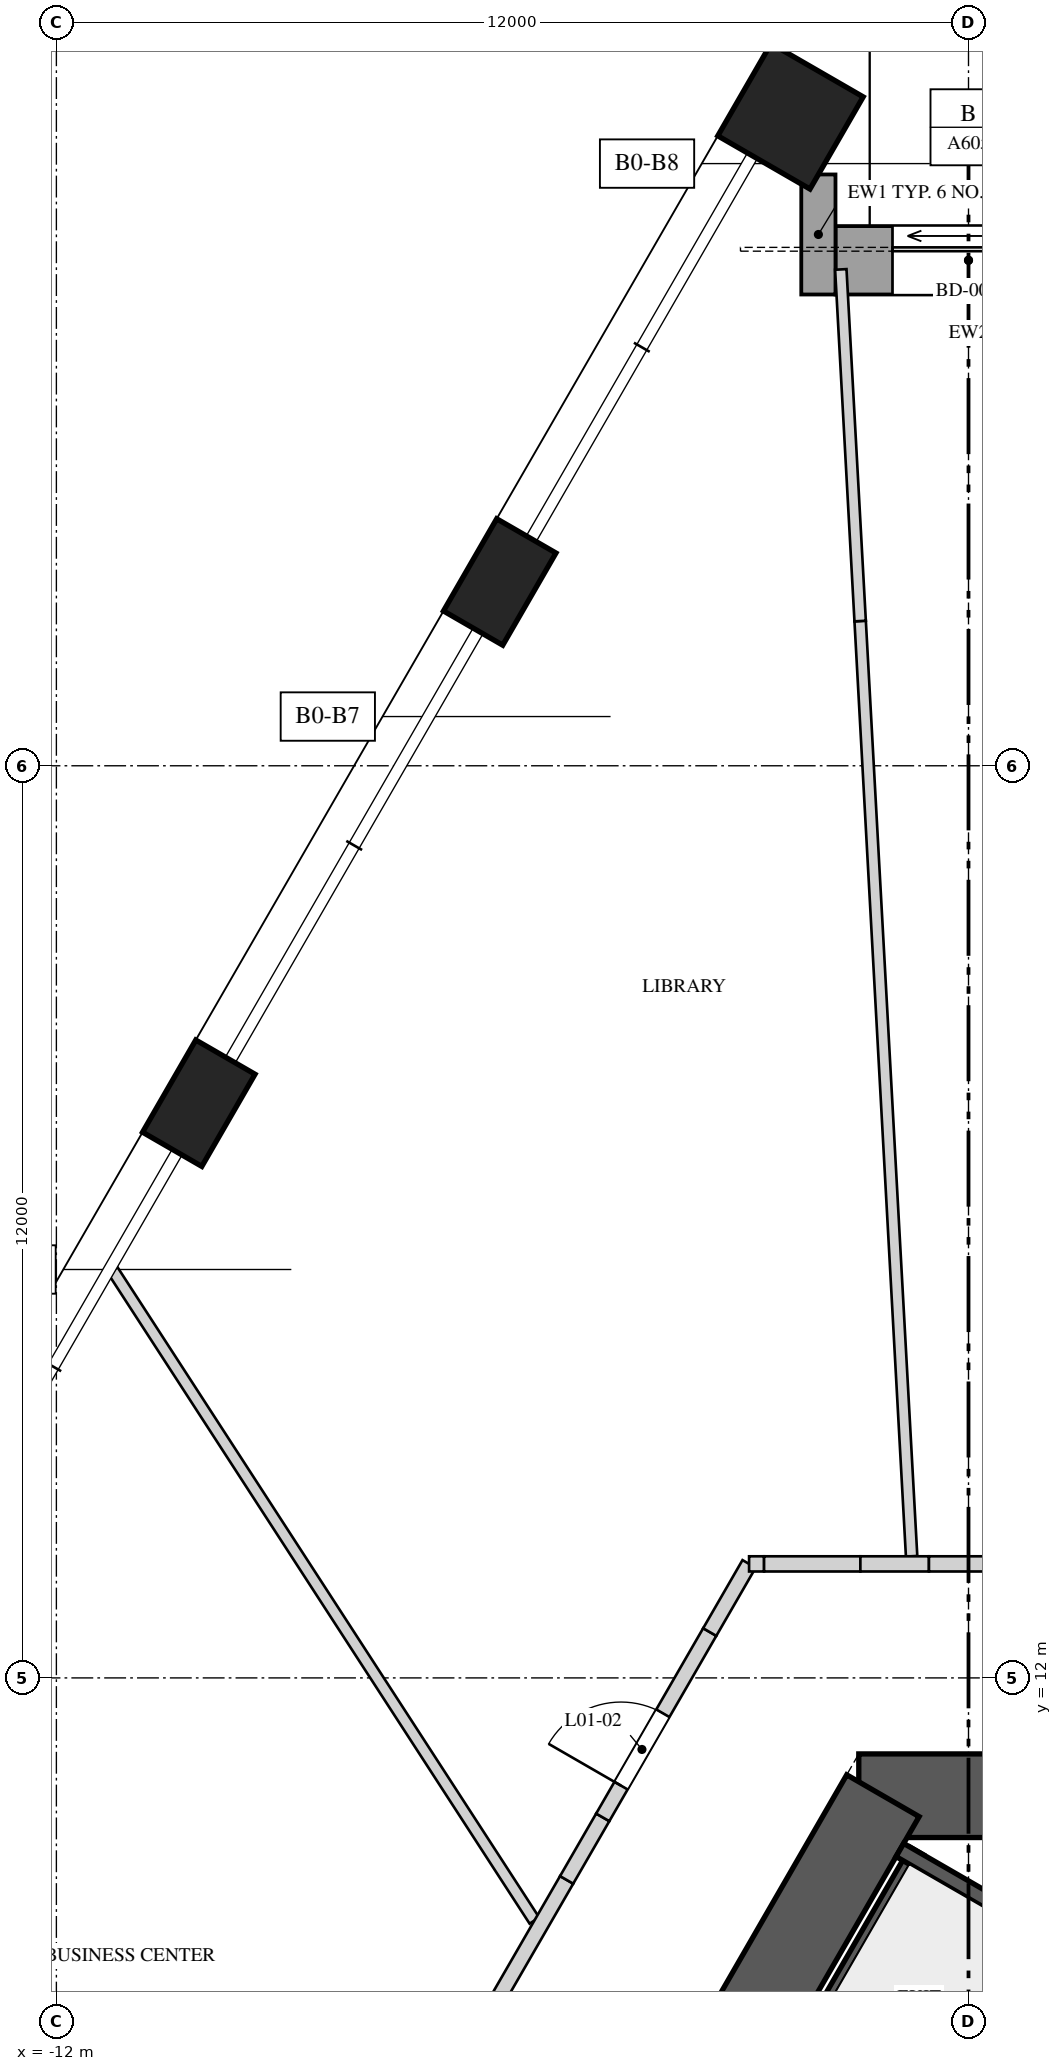
"""IFC4 building model, lengths in metres.
Left out: names, types, materials, properties, quantities, classifications, styles, units other than length and angle.
Written with IfcOpenShell. Run it as: python <this file> out.ifc"""

import sys

from ifc_helpers import new_model, si_unit, direction, frame, frame_2d, origin, origin_2d, place, context, subcontext, project, spatial, rectangle, extrude, element, fill, save


model = new_model("IFC4")
c1 = context("Model", 3, precision=1e-05, world=origin(), true_north=direction((0.0, 1.0)))
c2 = subcontext(c1, "Body", "Model", "MODEL_VIEW")
j1 = project(units=[si_unit("LENGTHUNIT", "METRE"), si_unit("PLANEANGLEUNIT", "RADIAN")], contexts=[c1])
p1 = place(None, origin())
s1 = spatial("IfcSite", under=j1, at=p1, CompositionType="ELEMENT")
p2 = place(p1, origin())
s2 = spatial("IfcBuilding", under=s1, at=p2, CompositionType="ELEMENT")
p3 = place(p2, frame((0.0, 0.0, 10.0)))
s3 = spatial("IfcBuildingStorey", under=s2, at=p3, CompositionType="ELEMENT", Elevation=10.0)
p4 = place(p3, frame((1.443, 10.45, 0.0), z_axis=(0.0, 0.0, 1.0), x_axis=(-1.0, 0.0, 0.0)))
e1 = element("IfcWall", 1, at=p4, inside=s3, PredefinedType="SHEAR", context=c2, shape_type="SweptSolid", body=[
    extrude(rectangle(XDim=2.887, YDim=1.1, at=frame_2d((1.443, 0.0))), origin(), (0.0, 0.0, 1.0), 5.0),
])
p5 = place(p3, frame((-1.126, 10.45, 0.0), z_axis=(0.0, 0.0, 1.0), x_axis=(-0.500001757713, -0.866024388966, 0.0)))
e2 = element("IfcWall", 2, at=p5, inside=s3, PredefinedType="SHEAR", context=c2, shape_type="SweptSolid", body=[
    extrude(rectangle(XDim=16.974, YDim=1.1, at=frame_2d((8.487, 0.0))), origin(), (0.0, 0.0, 1.0), 5.0),
])
p6 = place(p5, frame((6.692, 0.0, 0.0)))
e3 = element("IfcOpeningElement", 3, at=p6, cuts=e2, PredefinedType="OPENING", context=c2, shape_type="SweptSolid", body=[
    extrude(rectangle(XDim=1.0, YDim=2.4, at=frame_2d((0.5, 1.2))), frame((0.0, 0.56, 0.0), z_axis=(0.0, -1.0, 0.0), x_axis=(1.0, 0.0, 0.0)), (0.0, 0.0, 1.0), 1.12),
])
p7 = place(p5, frame((14.397, 0.0, 0.0)))
e4 = element("IfcOpeningElement", 4, at=p7, cuts=e2, PredefinedType="OPENING", context=c2, shape_type="SweptSolid", body=[
    extrude(rectangle(XDim=0.8, YDim=2.1, at=frame_2d((0.4, 1.05))), frame((0.0, 0.56, 0.0), z_axis=(0.0, -1.0, 0.0), x_axis=(1.0, 0.0, 0.0)), (0.0, 0.0, 1.0), 1.12),
])
p8 = place(p3, frame((-2.342, 32.544, 0.0), z_axis=(0.0, 0.0, 1.0), x_axis=(-0.5, -0.866025403784, 0.0)))
e5 = element("IfcColumn", 5, at=p8, inside=s3, PredefinedType="COLUMN", context=c2, shape_type="SweptSolid", body=[
    extrude(rectangle(XDim=1.4, YDim=1.4, at=origin_2d()), origin(), (0.0, 0.0, 1.0), 5.0),
])
for number, where, z_axis, x_axis in (
    (6, (-6.167, 26.418, 0.0), (0.0, 0.0, 1.0), (-0.5, -0.866, 0.0)),
    (7, (-10.126, 19.561, 0.0), (0.0, 0.0, 1.0), (-0.5, -0.866, 0.0)),
):
    element("IfcColumn", number, at=place(p3, frame(where, z_axis=z_axis, x_axis=x_axis)), inside=s3, PredefinedType="COLUMN", context=c2, shape_type="SweptSolid", body=[
        extrude(rectangle(XDim=1.4, YDim=0.9, at=origin_2d()), origin(), (0.0, 0.0, 1.0), 5.0),
    ])
p9 = place(p3, frame((-1.75, 30.65, 0.0), z_axis=(0.0, 0.0, 1.0), x_axis=(1.0, 0.0, 0.0)))
e8 = element("IfcWall", 8, at=p9, inside=s3, PredefinedType="SOLIDWALL", context=c2, shape_type="SweptSolid", body=[
    extrude(rectangle(XDim=3.5, YDim=0.9, at=frame_2d((1.75, 0.0))), origin(), (0.0, 0.0, 1.0), 4.3),
])
p10 = place(p9, frame((0.75, 0.0, 0.0)))
e9 = element("IfcOpeningElement", 9, at=p10, cuts=e8, PredefinedType="OPENING", context=c2, shape_type="SweptSolid", body=[
    extrude(rectangle(XDim=2.0, YDim=2.4, at=frame_2d((1.0, 1.2))), frame((0.0, 0.46, 0.0), z_axis=(0.0, -1.0, 0.0), x_axis=(1.0, 0.0, 0.0)), (0.0, 0.0, 1.0), 0.92),
])
p11 = place(p3, frame((-1.975, 31.779, 0.0), z_axis=(0.0, 0.0, 1.0), x_axis=(0.0, -1.0, 0.0)))
e10 = element("IfcWall", 10, at=p11, inside=s3, PredefinedType="SOLIDWALL", context=c2, shape_type="SweptSolid", body=[
    extrude(rectangle(XDim=1.579, YDim=0.45, at=frame_2d((0.79, 0.0))), origin(), (0.0, 0.0, 1.0), 2.55),
])
p12 = place(p3, frame((-0.68, 9.722, 0.0), z_axis=(0.0, 0.0, 1.0), x_axis=(-0.49998037582, -0.866036733513, 0.0)))
e11 = element("IfcWall", 11, at=p12, inside=s3, PredefinedType="SOLIDWALL", context=c2, shape_type="SweptSolid", body=[
    extrude(rectangle(XDim=6.2, YDim=0.2, at=frame_2d((3.1, 0.0))), origin(), (0.0, 0.0, 1.0), 4.65),
])
p13 = place(p3, frame((1.646, 8.45, 0.0), z_axis=(0.0, 0.0, 1.0), x_axis=(-0.500006002103, -0.866021938441, 0.0)))
e12 = element("IfcWall", 12, at=p13, inside=s3, PredefinedType="SOLIDWALL", context=c2, shape_type="SweptSolid", body=[
    extrude(rectangle(XDim=6.261, YDim=0.2, at=frame_2d((3.13, 0.0))), origin(), (0.0, 0.0, 1.0), 4.65),
])
p14 = place(p3, frame((1.806, 8.172, 0.0), z_axis=(0.0, 0.0, 1.0), x_axis=(-0.866054327916, 0.499949898588, 0.0)))
e13 = element("IfcWall", 13, at=p14, inside=s3, PredefinedType="SOLIDWALL", context=c2, shape_type="SweptSolid", body=[
    extrude(rectangle(XDim=3.128, YDim=0.2, at=frame_2d((1.564, 0.0))), origin(), (0.0, 0.0, 1.0), 4.65),
])
p15 = place(p3, frame((-5.711, 8.808, 0.0), z_axis=(0.0, 0.0, 1.0), x_axis=(-0.544077203012, 0.839035158478, 0.0)))
e14 = element("IfcWall", 14, at=p15, inside=s3, PredefinedType="PARTITIONING", context=c2, shape_type="SweptSolid", body=[
    extrude(rectangle(XDim=10.194, YDim=0.15, at=frame_2d((5.097, 0.0))), origin(), (0.0, 0.0, 1.0), 4.65),
])
p16 = place(p3, frame((-0.748, 13.6, 0.0), z_axis=(0.0, 0.0, 1.0), x_axis=(-0.054959765321, 0.998488569887, 0.0)))
e15 = element("IfcWall", 15, at=p16, inside=s3, PredefinedType="PARTITIONING", context=c2, shape_type="SweptSolid", body=[
    extrude(rectangle(XDim=12.323, YDim=0.15, at=frame_2d((6.161, 0.0))), origin(), (0.0, 0.0, 1.0), 3.55),
])
p17 = place(p3, frame((-1.426, 25.904, 0.0), z_axis=(0.0, 0.0, 1.0), x_axis=(-0.05490964551, 0.998491327368, 0.0)))
e16 = element("IfcWall", 16, at=p17, inside=s3, PredefinedType="PARTITIONING", context=c2, shape_type="SweptSolid", body=[
    extrude(rectangle(XDim=4.633, YDim=0.15, at=frame_2d((2.316, 0.0))), origin(), (0.0, 0.0, 1.0), 4.65),
])
p18 = place(p3, frame((-6.819, 6.689, 0.0), z_axis=(0.0, 0.0, 1.0), x_axis=(0.499952348839, 0.866052913447, 0.0)))
e17 = element("IfcWall", 17, at=p18, inside=s3, PredefinedType="SOLIDWALL", context=c2, shape_type="SweptSolid", body=[
    extrude(rectangle(XDim=3.064, YDim=0.2, at=frame_2d((1.532, 0.0))), origin(), (0.0, 0.0, 1.0), 4.65),
])
p19 = place(p3, frame((-5.287, 9.343, 0.0), z_axis=(0.0, 0.0, 1.0), x_axis=(0.500174821557, 0.865924446982, 0.0)))
e18 = element("IfcWall", 18, at=p19, inside=s3, PredefinedType="SOLIDWALL", context=c2, shape_type="SweptSolid", body=[
    extrude(rectangle(XDim=0.95, YDim=0.2, at=frame_2d((0.475, 0.0))), origin(), (0.0, 0.0, 1.0), 3.75),
])
p20 = place(p3, frame((-4.812, 10.165, 0.0), z_axis=(0.0, 0.0, 1.0), x_axis=(0.500000186108, 0.866025296335, 0.0)))
e19 = element("IfcWall", 19, at=p20, inside=s3, PredefinedType="SOLIDWALL", context=c2, shape_type="SweptSolid", body=[
    extrude(rectangle(XDim=2.815, YDim=0.2, at=frame_2d((1.408, 0.0))), origin(), (0.0, 0.0, 1.0), 4.65),
])
p21 = place(p20, frame((0.482, 0.0, 0.0)))
e20 = element("IfcOpeningElement", 20, at=p21, cuts=e19, PredefinedType="OPENING", context=c2, shape_type="SweptSolid", body=[
    extrude(rectangle(XDim=1.1, YDim=2.4, at=frame_2d((0.55, 1.2))), frame((0.0, 0.11, 0.0), z_axis=(0.0, -1.0, 0.0), x_axis=(1.0, 0.0, 0.0)), (0.0, 0.0, 1.0), 0.22),
])
p22 = place(p3, frame((-3.404, 12.604, 0.0), z_axis=(0.0, 0.0, 1.0), x_axis=(0.499994660107, 0.866028486751, 0.0)))
e21 = element("IfcWall", 21, at=p22, inside=s3, PredefinedType="SOLIDWALL", context=c2, shape_type="SweptSolid", body=[
    extrude(rectangle(XDim=1.035, YDim=0.2, at=frame_2d((0.518, 0.0))), origin(), (0.0, 0.0, 1.0), 3.55),
])
p23 = place(p3, frame((-2.887, 13.5, 0.0), z_axis=(0.0, 0.0, 1.0), x_axis=(1.0, 0.0, 0.0)))
e22 = element("IfcWall", 22, at=p23, inside=s3, PredefinedType="SOLIDWALL", context=c2, shape_type="SweptSolid", body=[
    extrude(rectangle(XDim=0.197, YDim=0.2, at=frame_2d((0.099, 0.0))), origin(), (0.0, 0.0, 1.0), 3.55),
])
p24 = place(p3, frame((-2.689, 13.5, 0.0), z_axis=(0.0, 0.0, 1.0), x_axis=(1.0, 0.0, 0.0)))
e23 = element("IfcWall", 23, at=p24, inside=s3, PredefinedType="SOLIDWALL", context=c2, shape_type="SweptSolid", body=[
    extrude(rectangle(XDim=1.267, YDim=0.2, at=frame_2d((0.633, 0.0))), origin(), (0.0, 0.0, 1.0), 4.65),
])
p25 = place(p3, frame((-1.423, 13.5, 0.0), z_axis=(0.0, 0.0, 1.0), x_axis=(1.0, 0.0, 0.0)))
e24 = element("IfcWall", 24, at=p25, inside=s3, PredefinedType="SOLIDWALL", context=c2, shape_type="SweptSolid", body=[
    extrude(rectangle(XDim=0.902, YDim=0.2, at=frame_2d((0.451, 0.0))), origin(), (0.0, 0.0, 1.0), 3.55),
])
p26 = place(p3, frame((-0.52, 13.5, 0.0), z_axis=(0.0, 0.0, 1.0), x_axis=(1.0, 0.0, 0.0)))
e25 = element("IfcWall", 25, at=p26, inside=s3, PredefinedType="SOLIDWALL", context=c2, shape_type="SweptSolid", body=[
    extrude(rectangle(XDim=1.041, YDim=0.2, at=frame_2d((0.52, 0.0))), origin(), (0.0, 0.0, 1.0), 4.65),
])
p27 = place(p10, origin())
e26 = element("IfcDoor", 26, at=p27, inside=s3, OperationType="SLIDING_TO_LEFT", PredefinedType="DOOR", context=c2, shape_type="SweptSolid", body=[
    extrude(rectangle(XDim=2.0, YDim=2.4, at=frame_2d((1.0, 1.2))), frame((0.0, 0.025, 0.0), z_axis=(0.0, -1.0, 0.0), x_axis=(1.0, 0.0, 0.0)), (0.0, 0.0, 1.0), 0.05),
])
fill(e9, e26)
p28 = place(p21, origin())
e27 = element("IfcDoor", 27, at=p28, inside=s3, OperationType="SINGLE_SWING_RIGHT", PredefinedType="DOOR", context=c2, shape_type="SweptSolid", body=[
    extrude(rectangle(XDim=1.1, YDim=2.4, at=frame_2d((0.55, 1.2))), frame((0.0, 0.025, 0.0), z_axis=(0.0, -1.0, 0.0), x_axis=(1.0, 0.0, 0.0)), (0.0, 0.0, 1.0), 0.05),
])
fill(e20, e27)
save(model, sys.argv[1])
